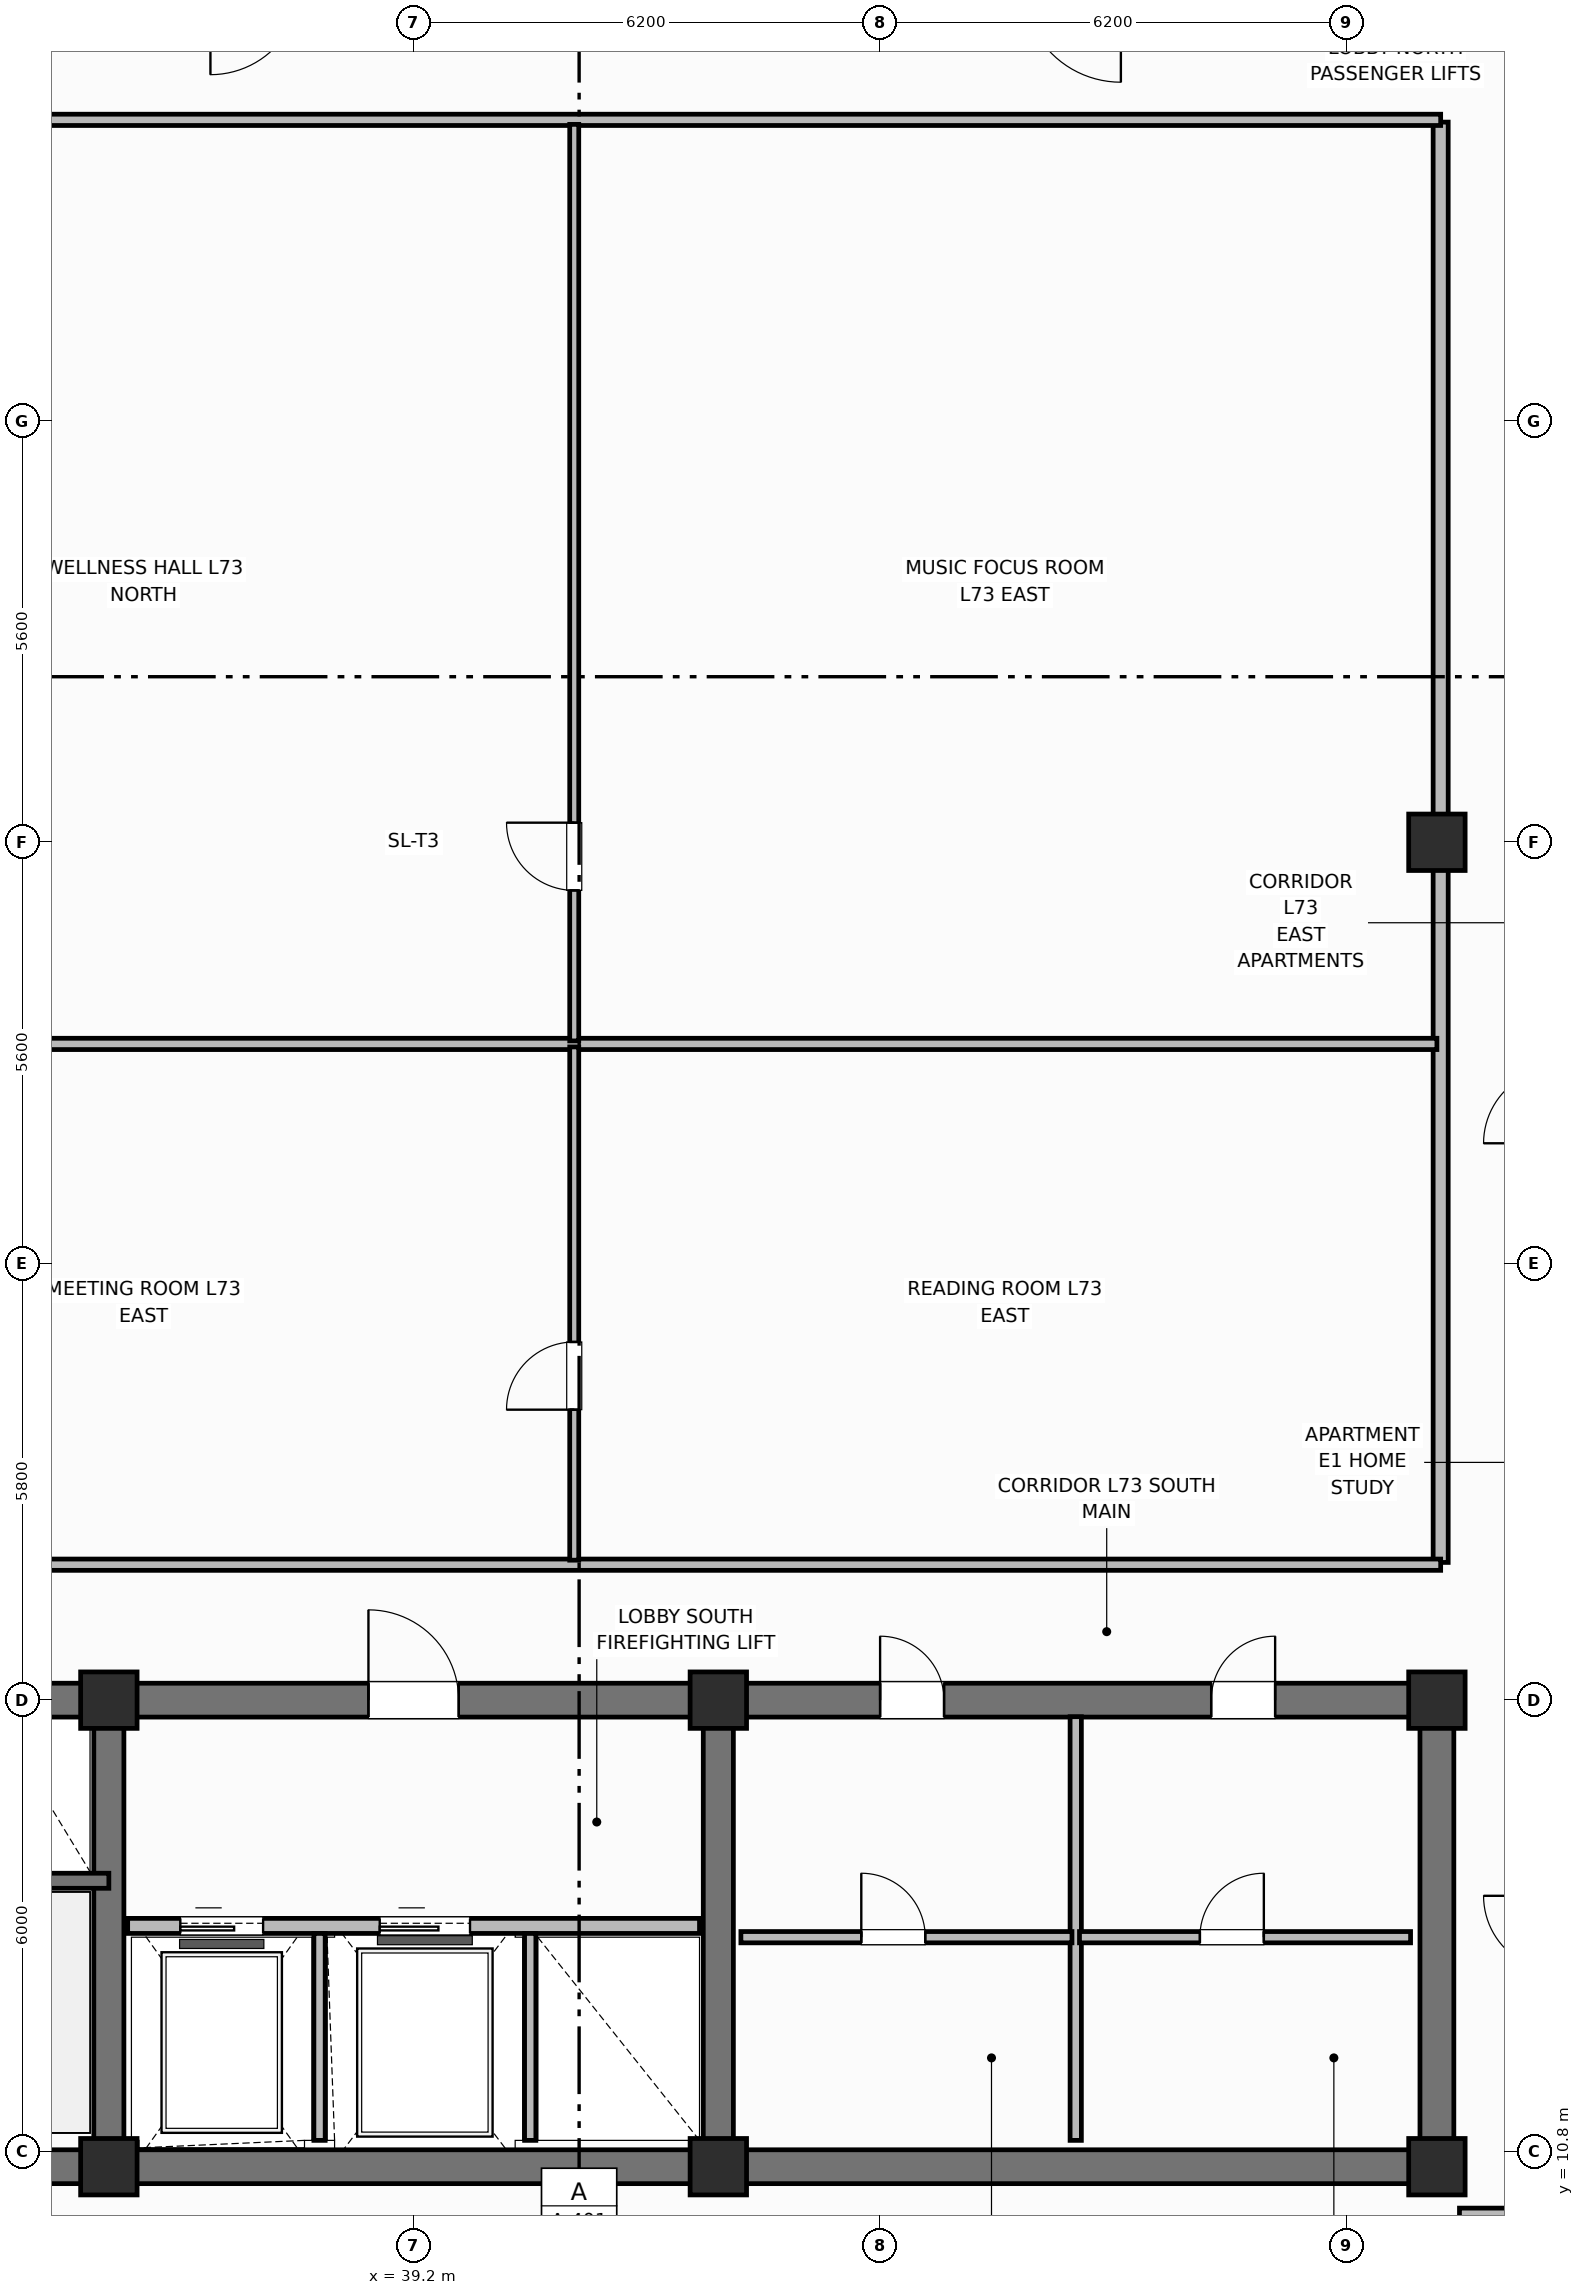
"""IFC4 building model, lengths in metres.
Left out: names, types, materials, properties, quantities, classifications, styles, units other than length and angle.
Written with IfcOpenShell. Run it as: python <this file> out.ifc"""

import sys

from ifc_helpers import new_model, si_unit, direction, frame, frame_2d, origin, origin_2d, place, context, subcontext, project, spatial, rectangle, extrude, element, fill, save


model = new_model("IFC4")
c1 = context("Model", 3, precision=1e-05, world=origin(), true_north=direction((0.0, 1.0)))
c2 = subcontext(c1, "Body", "Model", "MODEL_VIEW")
j1 = project(units=[si_unit("LENGTHUNIT", "METRE"), si_unit("PLANEANGLEUNIT", "RADIAN")], contexts=[c1])
p1 = place(None, origin())
s1 = spatial("IfcSite", under=j1, at=p1, CompositionType="ELEMENT")
p2 = place(p1, origin())
s2 = spatial("IfcBuilding", under=s1, at=p2, CompositionType="ELEMENT")
p3 = place(p2, frame((0.0, 0.0, 289.8)))
s3 = spatial("IfcBuildingStorey", under=s2, at=p3, CompositionType="ELEMENT", Elevation=289.8)
p4 = place(p3, frame((52.8, 10.6, 0.0), z_axis=(0.0, 0.0, 1.0), x_axis=(-1.0, 0.0, 0.0)))
e1 = element("IfcWall", 1, at=p4, inside=s3, PredefinedType="SHEAR", context=c2, shape_type="SweptSolid", body=[
    extrude(rectangle(XDim=27.2, YDim=0.45, at=frame_2d((13.6, 0.0))), origin(), (0.0, 0.0, 1.0), 3.7),
])
p5 = place(p3, frame((52.8, 10.825, 0.0), z_axis=(0.0, 0.0, 1.0), x_axis=(0.0, 1.0, 0.0)))
e2 = element("IfcWall", 2, at=p5, inside=s3, PredefinedType="SHEAR", context=c2, shape_type="SweptSolid", body=[
    extrude(rectangle(XDim=5.75, YDim=0.45, at=frame_2d((2.875, 0.0))), origin(), (0.0, 0.0, 1.0), 3.7),
])
p6 = place(p3, frame((25.6, 16.8, 0.0), z_axis=(0.0, 0.0, 1.0), x_axis=(1.0, 0.0, 0.0)))
e3 = element("IfcWall", 3, at=p6, inside=s3, PredefinedType="SHEAR", context=c2, shape_type="SweptSolid", body=[
    extrude(rectangle(XDim=27.2, YDim=0.45, at=frame_2d((13.6, 0.0))), origin(), (0.0, 0.0, 1.0), 3.7),
])
p7 = place(p6, frame((1.7, 0.0, 0.0)))
e4 = element("IfcOpeningElement", 4, at=p7, cuts=e3, PredefinedType="OPENING", context=c2, shape_type="SweptSolid", body=[
    extrude(rectangle(XDim=1.1, YDim=2.15, at=frame_2d((0.55, 1.075))), frame((0.0, 0.235, 0.0), z_axis=(0.0, -1.0, 0.0), x_axis=(1.0, 0.0, 0.0)), (0.0, 0.0, 1.0), 0.47),
])
p8 = place(p6, frame((4.45, 0.0, 0.0)))
e5 = element("IfcOpeningElement", 5, at=p8, cuts=e3, PredefinedType="OPENING", context=c2, shape_type="SweptSolid", body=[
    extrude(rectangle(XDim=0.85, YDim=2.1, at=frame_2d((0.425, 1.05))), frame((0.0, 0.235, 0.0), z_axis=(0.0, -1.0, 0.0), x_axis=(1.0, 0.0, 0.0)), (0.0, 0.0, 1.0), 0.47),
])
p9 = place(p6, frame((6.5, 0.0, 0.0)))
e6 = element("IfcOpeningElement", 6, at=p9, cuts=e3, PredefinedType="OPENING", context=c2, shape_type="SweptSolid", body=[
    extrude(rectangle(XDim=0.85, YDim=2.1, at=frame_2d((0.425, 1.05))), frame((0.0, 0.235, 0.0), z_axis=(0.0, -1.0, 0.0), x_axis=(1.0, 0.0, 0.0)), (0.0, 0.0, 1.0), 0.47),
])
p10 = place(p6, frame((13.0, 0.0, 0.0)))
e7 = element("IfcOpeningElement", 7, at=p10, cuts=e3, PredefinedType="OPENING", context=c2, shape_type="SweptSolid", body=[
    extrude(rectangle(XDim=1.2, YDim=2.15, at=frame_2d((0.6, 1.075))), frame((0.0, 0.235, 0.0), z_axis=(0.0, -1.0, 0.0), x_axis=(1.0, 0.0, 0.0)), (0.0, 0.0, 1.0), 0.47),
])
p11 = place(p6, frame((19.8, 0.0, 0.0)))
e8 = element("IfcOpeningElement", 8, at=p11, cuts=e3, PredefinedType="OPENING", context=c2, shape_type="SweptSolid", body=[
    extrude(rectangle(XDim=0.85, YDim=2.1, at=frame_2d((0.425, 1.05))), frame((0.0, 0.235, 0.0), z_axis=(0.0, -1.0, 0.0), x_axis=(1.0, 0.0, 0.0)), (0.0, 0.0, 1.0), 0.47),
])
p12 = place(p6, frame((24.2, 0.0, 0.0)))
e9 = element("IfcOpeningElement", 9, at=p12, cuts=e3, PredefinedType="OPENING", context=c2, shape_type="SweptSolid", body=[
    extrude(rectangle(XDim=0.85, YDim=2.1, at=frame_2d((0.425, 1.05))), frame((0.0, 0.235, 0.0), z_axis=(0.0, -1.0, 0.0), x_axis=(1.0, 0.0, 0.0)), (0.0, 0.0, 1.0), 0.47),
])
for number, where, z_axis, x_axis in (
    (10, (35.15, 10.825, 0.0), (0.0, 0.0, 1.0), (0.0, 1.0, 0.0)),
    (11, (43.25, 10.825, 0.0), (0.0, 0.0, 1.0), (0.0, 1.0, 0.0)),
):
    element("IfcWall", number, at=place(p3, frame(where, z_axis=z_axis, x_axis=x_axis)), inside=s3, PredefinedType="SHEAR", context=c2, shape_type="SweptSolid", body=[
        extrude(rectangle(XDim=5.75, YDim=0.4, at=frame_2d((2.875, 0.0))), origin(), (0.0, 0.0, 1.0), 3.7),
    ])
for number, where, z_axis, x_axis in (
    (12, (35.15, 10.6, 0.0), (0.0, 0.0, 1.0), (1.0, 0.0, 0.0)),
    (13, (35.15, 16.8, 0.0), (0.0, 0.0, 1.0), (1.0, 0.0, 0.0)),
    (14, (43.25, 10.6, 0.0), (0.0, 0.0, 1.0), (1.0, 0.0, 0.0)),
    (15, (43.25, 16.8, 0.0), (0.0, 0.0, 1.0), (1.0, 0.0, 0.0)),
    (16, (52.8, 10.6, 0.0), (0.0, 0.0, 1.0), (1.0, 0.0, 0.0)),
    (17, (52.8, 16.8, 0.0), (0.0, 0.0, 1.0), (1.0, 0.0, 0.0)),
    (18, (52.8, 28.2, 0.0), (0.0, 0.0, 1.0), (1.0, 0.0, 0.0)),
):
    element("IfcColumn", number, at=place(p3, frame(where, z_axis=z_axis, x_axis=x_axis)), inside=s3, PredefinedType="COLUMN", context=c2, shape_type="SweptSolid", body=[
        extrude(rectangle(XDim=0.75, YDim=0.75, at=origin_2d()), origin(), (0.0, 0.0, 1.0), 3.7),
    ])
p13 = place(p3, frame((25.6, 14.4, 0.0), z_axis=(0.0, 0.0, 1.0), x_axis=(1.0, 0.0, 0.0)))
e19 = element("IfcWall", 19, at=p13, inside=s3, PredefinedType="SHEAR", context=c2, shape_type="SweptSolid", body=[
    extrude(rectangle(XDim=9.55, YDim=0.2, at=frame_2d((4.775, 0.0))), origin(), (0.0, 0.0, 1.0), 3.7),
])
p14 = place(p13, frame((1.05, 0.0, 0.0)))
e20 = element("IfcOpeningElement", 20, at=p14, cuts=e19, PredefinedType="OPENING", context=c2, shape_type="SweptSolid", body=[
    extrude(rectangle(XDim=1.1, YDim=2.15, at=frame_2d((0.55, 1.075))), frame((0.0, 0.11, 0.0), z_axis=(0.0, -1.0, 0.0), x_axis=(1.0, 0.0, 0.0)), (0.0, 0.0, 1.0), 0.22),
])
p15 = place(p3, frame((35.4, 13.8, 0.0), z_axis=(0.0, 0.0, 1.0), x_axis=(1.0, 0.0, 0.0)))
e21 = element("IfcWall", 21, at=p15, inside=s3, PredefinedType="PARTITIONING", context=c2, shape_type="SweptSolid", body=[
    extrude(rectangle(XDim=7.6, YDim=0.2, at=frame_2d((3.8, 0.0))), origin(), (0.0, 0.0, 1.0), 2.33),
])
p16 = place(p15, frame((0.7, 0.0, 0.0)))
e22 = element("IfcOpeningElement", 22, at=p16, cuts=e21, PredefinedType="OPENING", context=c2, shape_type="SweptSolid", body=[
    extrude(rectangle(XDim=1.1, YDim=2.15, at=frame_2d((0.55, 1.075))), frame((0.0, 0.11, 0.0), z_axis=(0.0, -1.0, 0.0), x_axis=(1.0, 0.0, 0.0)), (0.0, 0.0, 1.0), 0.22),
])
p17 = place(p15, frame((3.35, 0.0, 0.0)))
e23 = element("IfcOpeningElement", 23, at=p17, cuts=e21, PredefinedType="OPENING", context=c2, shape_type="SweptSolid", body=[
    extrude(rectangle(XDim=1.2, YDim=2.15, at=frame_2d((0.6, 1.075))), frame((0.0, 0.11, 0.0), z_axis=(0.0, -1.0, 0.0), x_axis=(1.0, 0.0, 0.0)), (0.0, 0.0, 1.0), 0.22),
])
for number, where, z_axis, x_axis in (
    (24, (37.95, 10.95, 0.0), (0.0, 0.0, 1.0), (0.0, 1.0, 0.0)),
    (25, (40.75, 10.95, 0.0), (0.0, 0.0, 1.0), (0.0, 1.0, 0.0)),
):
    element("IfcWall", number, at=place(p3, frame(where, z_axis=z_axis, x_axis=x_axis)), inside=s3, PredefinedType="PARTITIONING", context=c2, shape_type="SweptSolid", body=[
        extrude(rectangle(XDim=2.75, YDim=0.15, at=frame_2d((1.375, 0.0))), origin(), (0.0, 0.0, 1.0), 2.56),
    ])
p18 = place(p3, frame((48.0, 10.95, 0.0), z_axis=(0.0, 0.0, 1.0), x_axis=(0.0, 1.0, 0.0)))
e26 = element("IfcWall", 26, at=p18, inside=s3, PredefinedType="PARTITIONING", context=c2, shape_type="SweptSolid", body=[
    extrude(rectangle(XDim=5.63, YDim=0.15, at=frame_2d((2.815, 0.0))), origin(), (0.0, 0.0, 1.0), 2.56),
])
p19 = place(p3, frame((43.55, 13.65, 0.0), z_axis=(0.0, 0.0, 1.0), x_axis=(1.0, 0.0, 0.0)))
e27 = element("IfcWall", 27, at=p19, inside=s3, PredefinedType="PARTITIONING", context=c2, shape_type="SweptSolid", body=[
    extrude(rectangle(XDim=4.4, YDim=0.15, at=frame_2d((2.2, 0.0))), origin(), (0.0, 0.0, 1.0), 2.56),
])
p20 = place(p19, frame((1.6, 0.0, 0.0)))
e28 = element("IfcOpeningElement", 28, at=p20, cuts=e27, PredefinedType="OPENING", context=c2, shape_type="SweptSolid", body=[
    extrude(rectangle(XDim=0.85, YDim=2.1, at=frame_2d((0.425, 1.05))), frame((0.0, 0.085, 0.0), z_axis=(0.0, -1.0, 0.0), x_axis=(1.0, 0.0, 0.0)), (0.0, 0.0, 1.0), 0.17),
])
p21 = place(p3, frame((48.05, 13.65, 0.0), z_axis=(0.0, 0.0, 1.0), x_axis=(1.0, 0.0, 0.0)))
e29 = element("IfcWall", 29, at=p21, inside=s3, PredefinedType="PARTITIONING", context=c2, shape_type="SweptSolid", body=[
    extrude(rectangle(XDim=4.4, YDim=0.15, at=frame_2d((2.2, 0.0))), origin(), (0.0, 0.0, 1.0), 2.56),
])
p22 = place(p21, frame((1.6, 0.0, 0.0)))
e30 = element("IfcOpeningElement", 30, at=p22, cuts=e29, PredefinedType="OPENING", context=c2, shape_type="SweptSolid", body=[
    extrude(rectangle(XDim=0.85, YDim=2.1, at=frame_2d((0.425, 1.05))), frame((0.0, 0.085, 0.0), z_axis=(0.0, -1.0, 0.0), x_axis=(1.0, 0.0, 0.0)), (0.0, 0.0, 1.0), 0.17),
])
p23 = place(p3, frame((52.85, 18.63, 0.0), z_axis=(0.0, 0.0, 1.0), x_axis=(0.0, 1.0, 0.0)))
e31 = element("IfcWall", 31, at=p23, inside=s3, PredefinedType="PARTITIONING", context=c2, shape_type="SweptSolid", body=[
    extrude(rectangle(XDim=19.14, YDim=0.2, at=frame_2d((9.57, 0.0))), origin(), (0.0, 0.0, 1.0), 2.56),
])
for number, where, z_axis, x_axis in (
    (32, (29.9, 18.6, 0.0), (0.0, 0.0, 1.0), (1.0, 0.0, 0.0)),
    (33, (29.9, 37.8, 0.0), (0.0, 0.0, 1.0), (1.0, 0.0, 0.0)),
):
    element("IfcWall", number, at=place(p3, frame(where, z_axis=z_axis, x_axis=x_axis)), inside=s3, PredefinedType="PARTITIONING", context=c2, shape_type="SweptSolid", body=[
        extrude(rectangle(XDim=22.95, YDim=0.15, at=frame_2d((11.475, 0.0))), origin(), (0.0, 0.0, 1.0), 2.56),
    ])
p24 = place(p3, frame((29.93, 25.521, 0.0), z_axis=(0.0, 0.0, 1.0), x_axis=(1.0, 0.0, 0.0)))
e34 = element("IfcWall", 34, at=p24, inside=s3, PredefinedType="PARTITIONING", context=c2, shape_type="SweptSolid", body=[
    extrude(rectangle(XDim=22.87, YDim=0.15, at=frame_2d((11.435, 0.0))), origin(), (0.0, 0.0, 1.0), 2.56),
])
p25 = place(p3, frame((41.335, 18.66, 0.0), z_axis=(0.0, 0.0, 1.0), x_axis=(0.0, 1.0, 0.0)))
e35 = element("IfcWall", 35, at=p25, inside=s3, PredefinedType="PARTITIONING", context=c2, shape_type="SweptSolid", body=[
    extrude(rectangle(XDim=6.821, YDim=0.12, at=frame_2d((3.41, 0.0))), origin(), (0.0, 0.0, 1.0), 2.56),
])
p26 = place(p25, frame((2.0, 0.0, 0.0)))
e36 = element("IfcOpeningElement", 36, at=p26, cuts=e35, PredefinedType="OPENING", context=c2, shape_type="SweptSolid", body=[
    extrude(rectangle(XDim=0.9, YDim=2.1, at=frame_2d((0.45, 1.05))), frame((0.0, 0.07, 0.0), z_axis=(0.0, -1.0, 0.0), x_axis=(1.0, 0.0, 0.0)), (0.0, 0.0, 1.0), 0.14),
])
p27 = place(p3, frame((41.335, 25.56, 0.0), z_axis=(0.0, 0.0, 1.0), x_axis=(0.0, 1.0, 0.0)))
e37 = element("IfcWall", 37, at=p27, inside=s3, PredefinedType="PARTITIONING", context=c2, shape_type="SweptSolid", body=[
    extrude(rectangle(XDim=12.18, YDim=0.12, at=frame_2d((6.09, 0.0))), origin(), (0.0, 0.0, 1.0), 2.56),
])
p28 = place(p27, frame((2.0, 0.0, 0.0)))
e38 = element("IfcOpeningElement", 38, at=p28, cuts=e37, PredefinedType="OPENING", context=c2, shape_type="SweptSolid", body=[
    extrude(rectangle(XDim=0.9, YDim=2.1, at=frame_2d((0.45, 1.05))), frame((0.0, 0.07, 0.0), z_axis=(0.0, -1.0, 0.0), x_axis=(1.0, 0.0, 0.0)), (0.0, 0.0, 1.0), 0.14),
])
p29 = place(p3, frame((53.1, 9.95, 0.0), z_axis=(0.0, 0.0, 1.0), x_axis=(1.0, 0.0, 0.0)))
e39 = element("IfcWall", 39, at=p29, inside=s3, PredefinedType="PARTITIONING", context=c2, shape_type="SweptSolid", body=[
    extrude(rectangle(XDim=3.754, YDim=0.2, at=frame_2d((1.877, 0.0))), origin(), (0.0, 0.0, 1.0), 2.56),
])
p30 = place(p16, origin())
e40 = element("IfcDoor", 40, at=p30, inside=s3, OperationType="SLIDING_TO_LEFT", PredefinedType="DOOR", context=c2, shape_type="SweptSolid", body=[
    extrude(rectangle(XDim=1.1, YDim=2.15, at=frame_2d((0.55, 1.075))), frame((0.0, 0.025, 0.0), z_axis=(0.0, -1.0, 0.0), x_axis=(1.0, 0.0, 0.0)), (0.0, 0.0, 1.0), 0.05),
])
fill(e22, e40)
p31 = place(p17, origin())
e41 = element("IfcDoor", 41, at=p31, inside=s3, OperationType="SLIDING_TO_LEFT", PredefinedType="DOOR", context=c2, shape_type="SweptSolid", body=[
    extrude(rectangle(XDim=1.2, YDim=2.15, at=frame_2d((0.6, 1.075))), frame((0.0, 0.025, 0.0), z_axis=(0.0, -1.0, 0.0), x_axis=(1.0, 0.0, 0.0)), (0.0, 0.0, 1.0), 0.05),
])
fill(e23, e41)
p32 = place(p20, origin())
e42 = element("IfcDoor", 42, at=p32, inside=s3, OperationType="SINGLE_SWING_LEFT", PredefinedType="DOOR", context=c2, shape_type="SweptSolid", body=[
    extrude(rectangle(XDim=0.85, YDim=2.1, at=frame_2d((0.425, 1.05))), frame((0.0, 0.025, 0.0), z_axis=(0.0, -1.0, 0.0), x_axis=(1.0, 0.0, 0.0)), (0.0, 0.0, 1.0), 0.05),
])
fill(e28, e42)
p33 = place(p22, origin())
e43 = element("IfcDoor", 43, at=p33, inside=s3, OperationType="SINGLE_SWING_RIGHT", PredefinedType="DOOR", context=c2, shape_type="SweptSolid", body=[
    extrude(rectangle(XDim=0.85, YDim=2.1, at=frame_2d((0.425, 1.05))), frame((0.0, 0.025, 0.0), z_axis=(0.0, -1.0, 0.0), x_axis=(1.0, 0.0, 0.0)), (0.0, 0.0, 1.0), 0.05),
])
fill(e30, e43)
p34 = place(p26, origin())
e44 = element("IfcDoor", 44, at=p34, inside=s3, OperationType="SINGLE_SWING_LEFT", PredefinedType="DOOR", context=c2, shape_type="SweptSolid", body=[
    extrude(rectangle(XDim=0.9, YDim=2.1, at=frame_2d((0.45, 1.05))), frame((0.0, 0.025, 0.0), z_axis=(0.0, -1.0, 0.0), x_axis=(1.0, 0.0, 0.0)), (0.0, 0.0, 1.0), 0.05),
])
fill(e36, e44)
p35 = place(p28, origin())
e45 = element("IfcDoor", 45, at=p35, inside=s3, OperationType="SINGLE_SWING_RIGHT", PredefinedType="DOOR", context=c2, shape_type="SweptSolid", body=[
    extrude(rectangle(XDim=0.9, YDim=2.1, at=frame_2d((0.45, 1.05))), frame((0.0, 0.025, 0.0), z_axis=(0.0, -1.0, 0.0), x_axis=(1.0, 0.0, 0.0)), (0.0, 0.0, 1.0), 0.05),
])
fill(e38, e45)
p36 = place(p10, origin())
e46 = element("IfcDoor", 46, at=p36, inside=s3, OperationType="SINGLE_SWING_LEFT", PredefinedType="DOOR", context=c2, shape_type="SweptSolid", body=[
    extrude(rectangle(XDim=1.2, YDim=2.15, at=frame_2d((0.6, 1.075))), frame((0.0, 0.025, 0.0), z_axis=(0.0, -1.0, 0.0), x_axis=(1.0, 0.0, 0.0)), (0.0, 0.0, 1.0), 0.05),
])
fill(e7, e46)
p37 = place(p11, origin())
e47 = element("IfcDoor", 47, at=p37, inside=s3, OperationType="SINGLE_SWING_LEFT", PredefinedType="DOOR", context=c2, shape_type="SweptSolid", body=[
    extrude(rectangle(XDim=0.85, YDim=2.1, at=frame_2d((0.425, 1.05))), frame((0.0, 0.025, 0.0), z_axis=(0.0, -1.0, 0.0), x_axis=(1.0, 0.0, 0.0)), (0.0, 0.0, 1.0), 0.05),
])
fill(e8, e47)
p38 = place(p12, origin())
e48 = element("IfcDoor", 48, at=p38, inside=s3, OperationType="SINGLE_SWING_RIGHT", PredefinedType="DOOR", context=c2, shape_type="SweptSolid", body=[
    extrude(rectangle(XDim=0.85, YDim=2.1, at=frame_2d((0.425, 1.05))), frame((0.0, 0.025, 0.0), z_axis=(0.0, -1.0, 0.0), x_axis=(1.0, 0.0, 0.0)), (0.0, 0.0, 1.0), 0.05),
])
fill(e9, e48)
save(model, sys.argv[1])
